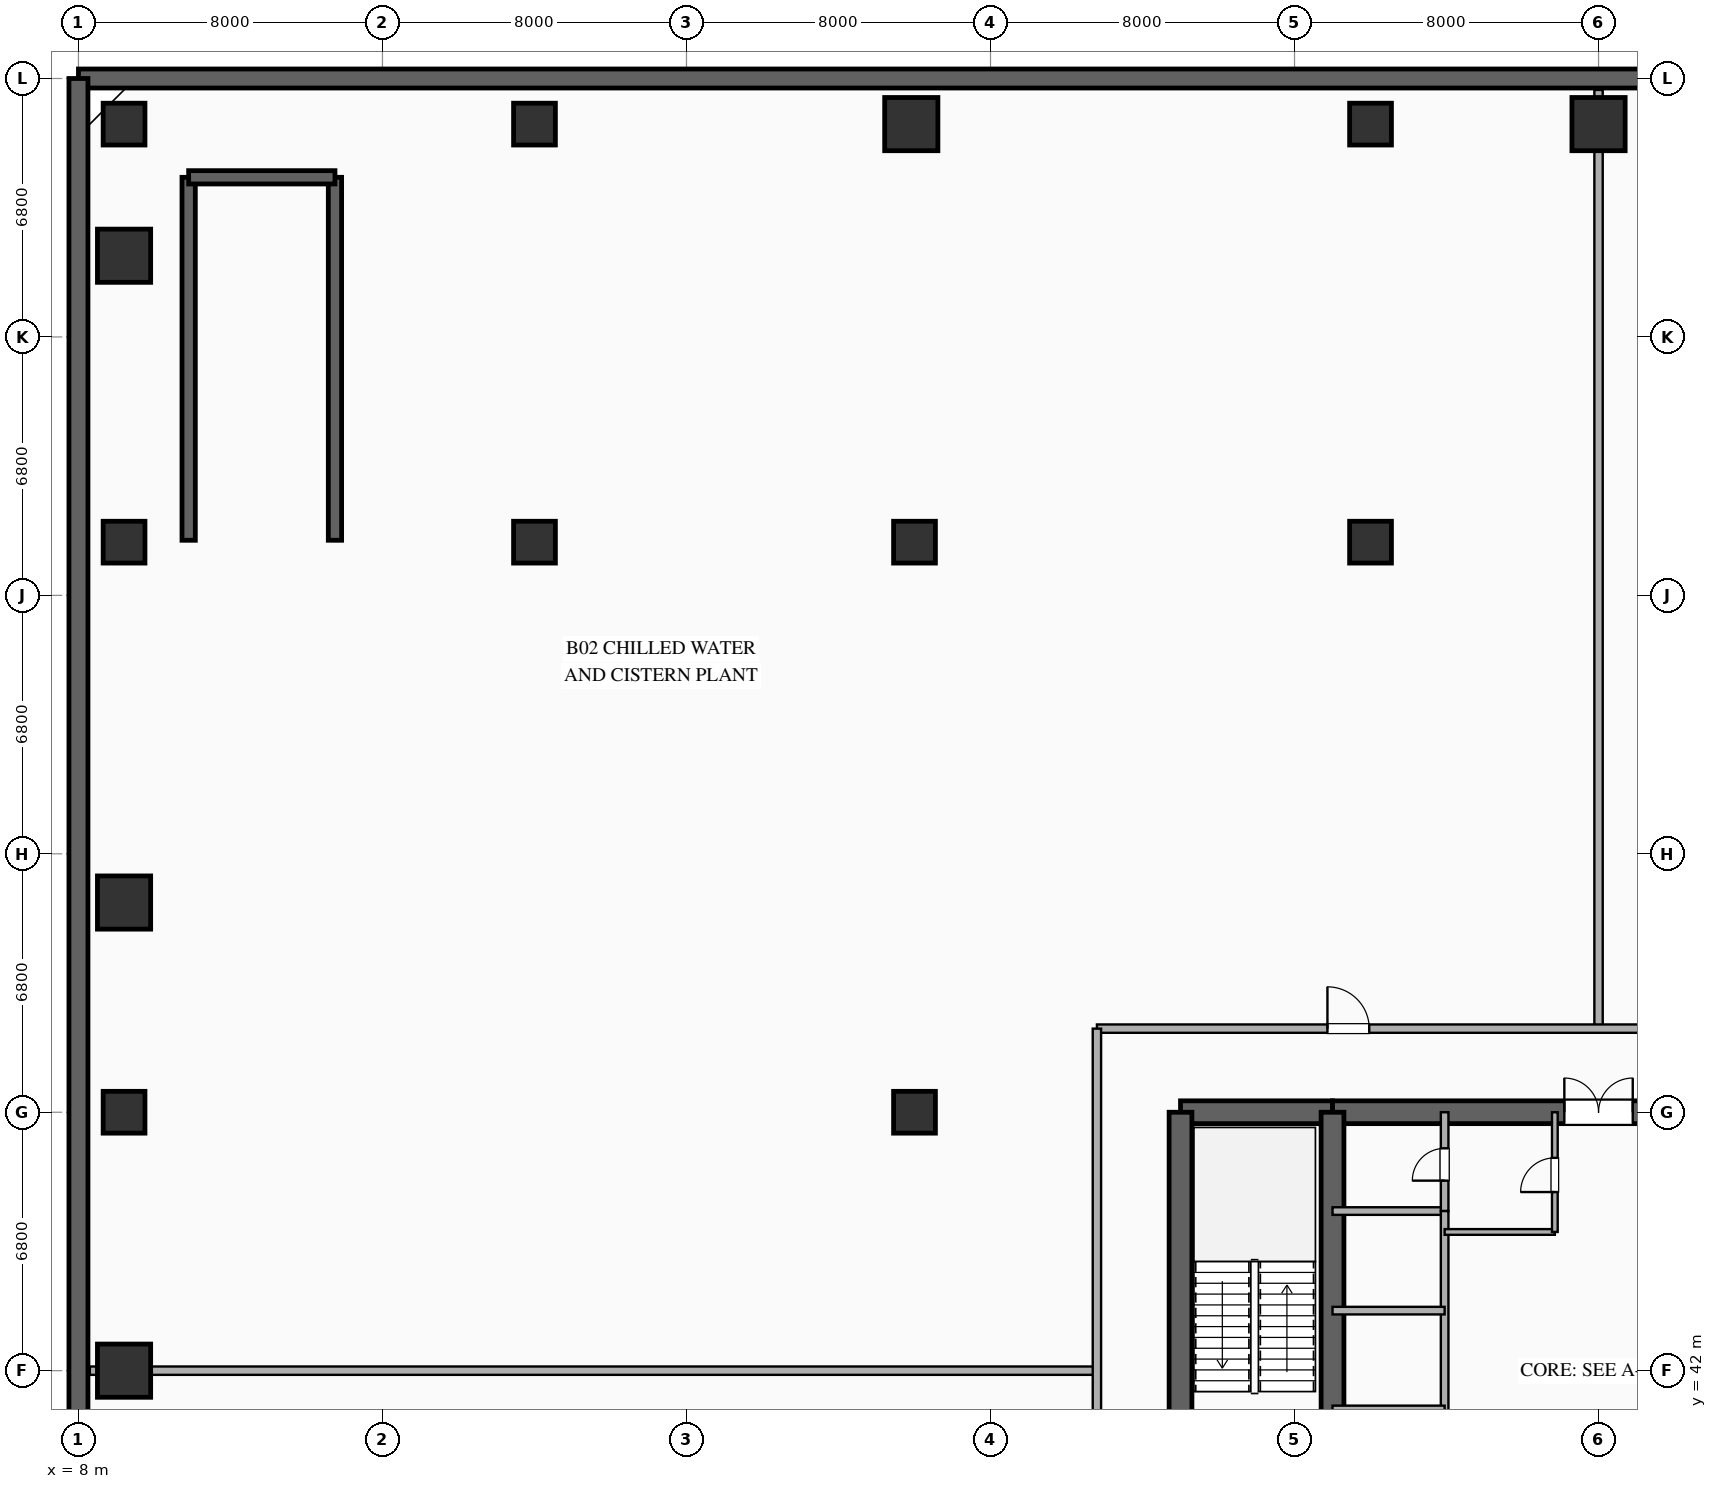
"""IFC4 building model, lengths in metres.
Left out: names, types, materials, properties, quantities, classifications, styles, units other than length and angle.
Written with IfcOpenShell. Run it as: python <this file> out.ifc"""

import sys

from ifc_helpers import new_model, si_unit, direction, frame, frame_2d, origin, origin_2d, place, context, subcontext, project, spatial, rectangle, extrude, element, fill, save


model = new_model("IFC4")
c1 = context("Model", 3, precision=1e-05, world=origin(), true_north=direction((0.0, 1.0)))
c2 = subcontext(c1, "Body", "Model", "MODEL_VIEW")
j1 = project(units=[si_unit("LENGTHUNIT", "METRE"), si_unit("PLANEANGLEUNIT", "RADIAN")], contexts=[c1])
p1 = place(None, origin())
s1 = spatial("IfcSite", under=j1, at=p1, CompositionType="ELEMENT")
p2 = place(p1, origin())
s2 = spatial("IfcBuilding", under=s1, at=p2, CompositionType="ELEMENT")
p3 = place(p2, frame((0.0, 0.0, -9.0)))
s3 = spatial("IfcBuildingStorey", under=s2, at=p3, CompositionType="ELEMENT", Elevation=-9.0)
p4 = place(p3, frame((88.0, 76.0, 0.0), z_axis=(0.0, 0.0, 1.0), x_axis=(-1.0, 0.0, 0.0)))
e1 = element("IfcWall", 1, at=p4, inside=s3, PredefinedType="SOLIDWALL", context=c2, shape_type="SweptSolid", body=[
    extrude(rectangle(XDim=80.0, YDim=0.5, at=frame_2d((40.0, 0.0))), origin(), (0.0, 0.0, 1.0), 4.18),
])
p5 = place(p3, frame((8.0, 76.0, 0.0), z_axis=(0.0, 0.0, 1.0), x_axis=(0.0, -1.0, 0.0)))
e2 = element("IfcWall", 2, at=p5, inside=s3, PredefinedType="SOLIDWALL", context=c2, shape_type="SweptSolid", body=[
    extrude(rectangle(XDim=68.0, YDim=0.5, at=frame_2d((34.0, 0.0))), origin(), (0.0, 0.0, 1.0), 4.18),
])
p6 = place(p3, frame((37.0, 48.8, 0.0), z_axis=(0.0, 0.0, 1.0), x_axis=(1.0, 0.0, 0.0)))
e3 = element("IfcWall", 3, at=p6, inside=s3, PredefinedType="SHEAR", context=c2, shape_type="SweptSolid", body=[
    extrude(rectangle(XDim=4.0, YDim=0.6, at=frame_2d((2.0, 0.0))), origin(), (0.0, 0.0, 1.0), 4.18),
])
p7 = place(p3, frame((41.0, 48.8, 0.0), z_axis=(0.0, 0.0, 1.0), x_axis=(1.0, 0.0, 0.0)))
e4 = element("IfcWall", 4, at=p7, inside=s3, PredefinedType="SHEAR", context=c2, shape_type="SweptSolid", body=[
    extrude(rectangle(XDim=14.0, YDim=0.6, at=frame_2d((7.0, 0.0))), origin(), (0.0, 0.0, 1.0), 4.18),
])
p8 = place(p7, frame((6.1, 0.0, 0.0)))
e5 = element("IfcOpeningElement", 5, at=p8, cuts=e4, PredefinedType="OPENING", context=c2, shape_type="SweptSolid", body=[
    extrude(rectangle(XDim=1.8, YDim=2.25, at=frame_2d((0.9, 1.125))), frame((0.0, 0.31, 0.0), z_axis=(0.0, -1.0, 0.0), x_axis=(1.0, 0.0, 0.0)), (0.0, 0.0, 1.0), 0.62),
])
p9 = place(p3, frame((37.0, 35.2, 0.0), z_axis=(0.0, 0.0, 1.0), x_axis=(0.0, 1.0, 0.0)))
e6 = element("IfcWall", 6, at=p9, inside=s3, PredefinedType="SHEAR", context=c2, shape_type="SweptSolid", body=[
    extrude(rectangle(XDim=13.6, YDim=0.6, at=frame_2d((6.8, 0.0))), origin(), (0.0, 0.0, 1.0), 4.18),
])
p10 = place(p9, frame((1.5, 0.0, 0.0)))
e7 = element("IfcOpeningElement", 7, at=p10, cuts=e6, PredefinedType="OPENING", context=c2, shape_type="SweptSolid", body=[
    extrude(rectangle(XDim=1.2, YDim=2.15, at=frame_2d((0.6, 1.075))), frame((0.0, 0.31, 0.0), z_axis=(0.0, -1.0, 0.0), x_axis=(1.0, 0.0, 0.0)), (0.0, 0.0, 1.0), 0.62),
])
p11 = place(p3, frame((41.0, 35.2, 0.0), z_axis=(0.0, 0.0, 1.0), x_axis=(0.0, 1.0, 0.0)))
e8 = element("IfcWall", 8, at=p11, inside=s3, PredefinedType="SHEAR", context=c2, shape_type="SweptSolid", body=[
    extrude(rectangle(XDim=13.6, YDim=0.6, at=frame_2d((6.8, 0.0))), origin(), (0.0, 0.0, 1.0), 4.18),
])
p12 = place(p11, frame((1.15, 0.0, 0.0)))
e9 = element("IfcOpeningElement", 9, at=p12, cuts=e8, PredefinedType="OPENING", context=c2, shape_type="SweptSolid", body=[
    extrude(rectangle(XDim=1.1, YDim=2.2, at=frame_2d((0.55, 1.1))), frame((0.0, 0.31, 0.0), z_axis=(0.0, -1.0, 0.0), x_axis=(1.0, 0.0, 0.0)), (0.0, 0.0, 1.0), 0.62),
])
for number, where, z_axis, x_axis in (
    (10, (9.2, 74.8, 0.0), (0.0, 0.0, 1.0), (1.0, 0.0, 0.0)),
    (11, (9.2, 63.8, 0.0), (0.0, 0.0, 1.0), (1.0, 0.0, 0.0)),
    (12, (20.0, 74.8, 0.0), (0.0, 0.0, 1.0), (1.0, 0.0, 0.0)),
    (13, (20.0, 63.8, 0.0), (0.0, 0.0, 1.0), (1.0, 0.0, 0.0)),
    (14, (30.0, 63.8, 0.0), (0.0, 0.0, 1.0), (1.0, 0.0, 0.0)),
    (15, (42.0, 74.8, 0.0), (0.0, 0.0, 1.0), (1.0, 0.0, 0.0)),
    (16, (42.0, 63.8, 0.0), (0.0, 0.0, 1.0), (1.0, 0.0, 0.0)),
    (17, (9.2, 48.8, 0.0), (0.0, 0.0, 1.0), (1.0, 0.0, 0.0)),
    (18, (30.0, 48.8, 0.0), (0.0, 0.0, 1.0), (1.0, 0.0, 0.0)),
):
    element("IfcColumn", number, at=place(p3, frame(where, z_axis=z_axis, x_axis=x_axis)), inside=s3, PredefinedType="COLUMN", context=c2, shape_type="SweptSolid", body=[
        extrude(rectangle(XDim=1.1, YDim=1.1, at=origin_2d()), origin(), (0.0, 0.0, 1.0), 4.18),
    ])
for number, where, z_axis, x_axis in (
    (19, (48.0, 74.8, 0.0), (0.0, 0.0, 1.0), (1.0, 0.0, 0.0)),
    (20, (29.916, 74.8, 0.0), (0.0, 0.0, 1.0), (1.0, 0.0, 0.0)),
    (21, (9.2, 71.337, 0.0), (0.0, 0.0, 1.0), (1.0, 0.0, 0.0)),
    (22, (9.2, 54.318, 0.0), (0.0, 0.0, 1.0), (1.0, 0.0, 0.0)),
    (23, (9.2, 42.0, 0.0), (0.0, 0.0, 1.0), (1.0, 0.0, 0.0)),
):
    element("IfcColumn", number, at=place(p3, frame(where, z_axis=z_axis, x_axis=x_axis)), inside=s3, PredefinedType="COLUMN", context=c2, shape_type="SweptSolid", body=[
        extrude(rectangle(XDim=1.4, YDim=1.4, at=origin_2d()), origin(), (0.0, 0.0, 1.0), 4.18),
    ])
for number, where, z_axis, x_axis in (
    (24, (10.9, 63.85, 0.0), (0.0, 0.0, 1.0), (0.0, 1.0, 0.0)),
    (25, (14.75, 63.85, 0.0), (0.0, 0.0, 1.0), (0.0, 1.0, 0.0)),
):
    element("IfcWall", number, at=place(p3, frame(where, z_axis=z_axis, x_axis=x_axis)), inside=s3, PredefinedType="SHEAR", context=c2, shape_type="SweptSolid", body=[
        extrude(rectangle(XDim=9.55, YDim=0.35, at=frame_2d((4.775, 0.0))), origin(), (0.0, 0.0, 1.0), 4.18),
    ])
p13 = place(p3, frame((10.9, 73.4, 0.0), z_axis=(0.0, 0.0, 1.0), x_axis=(1.0, 0.0, 0.0)))
e26 = element("IfcWall", 26, at=p13, inside=s3, PredefinedType="SHEAR", context=c2, shape_type="SweptSolid", body=[
    extrude(rectangle(XDim=3.85, YDim=0.35, at=frame_2d((1.925, 0.0))), origin(), (0.0, 0.0, 1.0), 4.18),
])
p14 = place(p3, frame((41.0, 46.2, 0.0), z_axis=(0.0, 0.0, 1.0), x_axis=(1.0, 0.0, 0.0)))
e27 = element("IfcWall", 27, at=p14, inside=s3, PredefinedType="SOLIDWALL", context=c2, shape_type="SweptSolid", body=[
    extrude(rectangle(XDim=2.95, YDim=0.2, at=frame_2d((1.475, 0.0))), origin(), (0.0, 0.0, 1.0), 3.38),
])
p15 = place(p3, frame((43.95, 46.2, 0.0), z_axis=(0.0, 0.0, 1.0), x_axis=(0.0, 1.0, 0.0)))
e28 = element("IfcWall", 28, at=p15, inside=s3, PredefinedType="SOLIDWALL", context=c2, shape_type="SweptSolid", body=[
    extrude(rectangle(XDim=2.6, YDim=0.2, at=frame_2d((1.3, 0.0))), origin(), (0.0, 0.0, 1.0), 3.38),
])
p16 = place(p15, frame((0.8, 0.0, 0.0)))
e29 = element("IfcOpeningElement", 29, at=p16, cuts=e28, PredefinedType="OPENING", context=c2, shape_type="SweptSolid", body=[
    extrude(rectangle(XDim=0.85, YDim=2.15, at=frame_2d((0.425, 1.075))), frame((0.0, 0.11, 0.0), z_axis=(0.0, -1.0, 0.0), x_axis=(1.0, 0.0, 0.0)), (0.0, 0.0, 1.0), 0.22),
])
p17 = place(p3, frame((43.95, 38.4, 0.0), z_axis=(0.0, 0.0, 1.0), x_axis=(0.0, 1.0, 0.0)))
e30 = element("IfcWall", 30, at=p17, inside=s3, PredefinedType="SOLIDWALL", context=c2, shape_type="SweptSolid", body=[
    extrude(rectangle(XDim=7.8, YDim=0.2, at=frame_2d((3.9, 0.0))), origin(), (0.0, 0.0, 1.0), 3.38),
])
for number, where, z_axis, x_axis in (
    (31, (41.0, 40.98, 0.0), (0.0, 0.0, 1.0), (1.0, 0.0, 0.0)),
    (32, (41.0, 43.58, 0.0), (0.0, 0.0, 1.0), (1.0, 0.0, 0.0)),
):
    element("IfcWall", number, at=place(p3, frame(where, z_axis=z_axis, x_axis=x_axis)), inside=s3, PredefinedType="SOLIDWALL", context=c2, shape_type="SweptSolid", body=[
        extrude(rectangle(XDim=2.95, YDim=0.2, at=frame_2d((1.475, 0.0))), origin(), (0.0, 0.0, 1.0), 3.38),
    ])
p18 = place(p3, frame((43.95, 45.65, 0.0), z_axis=(0.0, 0.0, 1.0), x_axis=(1.0, 0.0, 0.0)))
e33 = element("IfcWall", 33, at=p18, inside=s3, PredefinedType="PARTITIONING", context=c2, shape_type="SweptSolid", body=[
    extrude(rectangle(XDim=2.9, YDim=0.15, at=frame_2d((1.45, 0.0))), origin(), (0.0, 0.0, 1.0), 3.38),
])
p19 = place(p3, frame((46.85, 45.65, 0.0), z_axis=(0.0, 0.0, 1.0), x_axis=(0.0, 1.0, 0.0)))
e34 = element("IfcWall", 34, at=p19, inside=s3, PredefinedType="PARTITIONING", context=c2, shape_type="SweptSolid", body=[
    extrude(rectangle(XDim=3.15, YDim=0.15, at=frame_2d((1.575, 0.0))), origin(), (0.0, 0.0, 1.0), 3.38),
])
p20 = place(p19, frame((1.05, 0.0, 0.0)))
e35 = element("IfcOpeningElement", 35, at=p20, cuts=e34, PredefinedType="OPENING", context=c2, shape_type="SweptSolid", body=[
    extrude(rectangle(XDim=0.9, YDim=2.15, at=frame_2d((0.45, 1.075))), frame((0.0, 0.085, 0.0), z_axis=(0.0, -1.0, 0.0), x_axis=(1.0, 0.0, 0.0)), (0.0, 0.0, 1.0), 0.17),
])
p21 = place(p3, frame((34.8, 42.0, 0.0), z_axis=(0.0, 0.0, 1.0), x_axis=(-1.0, 0.0, 0.0)))
e36 = element("IfcWall", 36, at=p21, inside=s3, PredefinedType="SOLIDWALL", context=c2, shape_type="SweptSolid", body=[
    extrude(rectangle(XDim=26.5, YDim=0.22, at=frame_2d((13.25, 0.0))), origin(), (0.0, 0.0, 1.0), 3.38),
])
p22 = place(p3, frame((48.0, 51.0, 0.0), z_axis=(0.0, 0.0, 1.0), x_axis=(0.0, 1.0, 0.0)))
e37 = element("IfcWall", 37, at=p22, inside=s3, PredefinedType="SOLIDWALL", context=c2, shape_type="SweptSolid", body=[
    extrude(rectangle(XDim=24.7, YDim=0.22, at=frame_2d((12.35, 0.0))), origin(), (0.0, 0.0, 1.0), 3.38),
])
p23 = place(p3, frame((34.8, 51.0, 0.0), z_axis=(0.0, 0.0, 1.0), x_axis=(1.0, 0.0, 0.0)))
e38 = element("IfcWall", 38, at=p23, inside=s3, PredefinedType="SOLIDWALL", context=c2, shape_type="SweptSolid", body=[
    extrude(rectangle(XDim=26.4, YDim=0.22, at=frame_2d((13.2, 0.0))), origin(), (0.0, 0.0, 1.0), 3.38),
])
p24 = place(p23, frame((19.234, 0.0, 0.0)))
e39 = element("IfcOpeningElement", 39, at=p24, cuts=e38, PredefinedType="OPENING", context=c2, shape_type="SweptSolid", body=[
    extrude(rectangle(XDim=1.1, YDim=2.15, at=frame_2d((0.55, 1.075))), frame((0.0, 0.12, 0.0), z_axis=(0.0, -1.0, 0.0), x_axis=(1.0, 0.0, 0.0)), (0.0, 0.0, 1.0), 0.24),
])
p25 = place(p23, frame((6.066, 0.0, 0.0)))
e40 = element("IfcOpeningElement", 40, at=p25, cuts=e38, PredefinedType="OPENING", context=c2, shape_type="SweptSolid", body=[
    extrude(rectangle(XDim=1.1, YDim=2.15, at=frame_2d((0.55, 1.075))), frame((0.0, 0.12, 0.0), z_axis=(0.0, -1.0, 0.0), x_axis=(1.0, 0.0, 0.0)), (0.0, 0.0, 1.0), 0.24),
])
p26 = place(p3, frame((34.8, 33.0, 0.0), z_axis=(0.0, 0.0, 1.0), x_axis=(0.0, 1.0, 0.0)))
e41 = element("IfcWall", 41, at=p26, inside=s3, PredefinedType="SOLIDWALL", context=c2, shape_type="SweptSolid", body=[
    extrude(rectangle(XDim=18.0, YDim=0.22, at=frame_2d((9.0, 0.0))), origin(), (0.0, 0.0, 1.0), 3.38),
])
p27 = place(p8, origin())
e42 = element("IfcDoor", 42, at=p27, inside=s3, OperationType="DOUBLE_DOOR_SINGLE_SWING", PredefinedType="DOOR", context=c2, shape_type="SweptSolid", body=[
    extrude(rectangle(XDim=1.8, YDim=2.25, at=frame_2d((0.9, 1.125))), frame((0.0, 0.025, 0.0), z_axis=(0.0, -1.0, 0.0), x_axis=(1.0, 0.0, 0.0)), (0.0, 0.0, 1.0), 0.05),
])
fill(e5, e42)
p28 = place(p16, origin())
e43 = element("IfcDoor", 43, at=p28, inside=s3, OperationType="SINGLE_SWING_LEFT", PredefinedType="DOOR", context=c2, shape_type="SweptSolid", body=[
    extrude(rectangle(XDim=0.85, YDim=2.15, at=frame_2d((0.425, 1.075))), frame((0.0, 0.025, 0.0), z_axis=(0.0, -1.0, 0.0), x_axis=(1.0, 0.0, 0.0)), (0.0, 0.0, 1.0), 0.05),
])
fill(e29, e43)
p29 = place(p20, origin())
e44 = element("IfcDoor", 44, at=p29, inside=s3, OperationType="SINGLE_SWING_LEFT", PredefinedType="DOOR", context=c2, shape_type="SweptSolid", body=[
    extrude(rectangle(XDim=0.9, YDim=2.15, at=frame_2d((0.45, 1.075))), frame((0.0, 0.025, 0.0), z_axis=(0.0, -1.0, 0.0), x_axis=(1.0, 0.0, 0.0)), (0.0, 0.0, 1.0), 0.05),
])
fill(e35, e44)
p30 = place(p25, origin())
e45 = element("IfcDoor", 45, at=p30, inside=s3, OperationType="SINGLE_SWING_LEFT", PredefinedType="DOOR", context=c2, shape_type="SweptSolid", body=[
    extrude(rectangle(XDim=1.1, YDim=2.15, at=frame_2d((0.55, 1.075))), frame((0.0, 0.025, 0.0), z_axis=(0.0, -1.0, 0.0), x_axis=(1.0, 0.0, 0.0)), (0.0, 0.0, 1.0), 0.05),
])
fill(e40, e45)
save(model, sys.argv[1])
